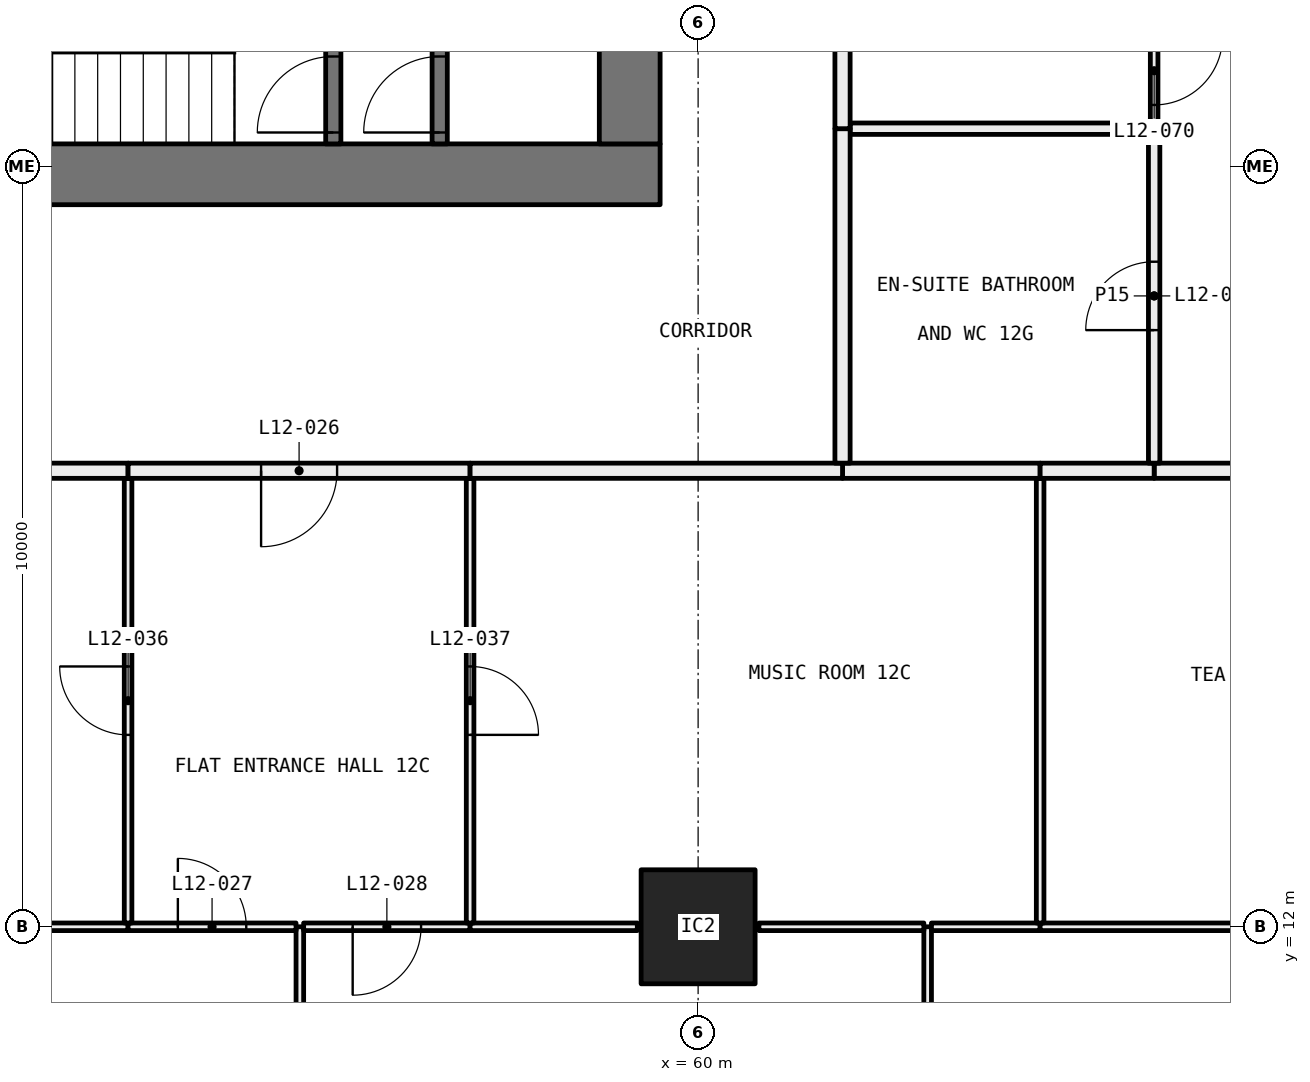
"""IFC4 building model, lengths in metres.
Left out: names, types, materials, properties, quantities, classifications, styles, units other than length and angle.
Written with IfcOpenShell. Run it as: python <this file> out.ifc"""

import sys

from ifc_helpers import new_model, si_unit, direction, frame, frame_2d, origin, origin_2d, place, context, subcontext, project, spatial, rectangle, hollow_rectangle, extrude, element, fill, save


model = new_model("IFC4")
c1 = context("Model", 3, precision=1e-05, world=origin(), true_north=direction((0.0, 1.0)))
c2 = subcontext(c1, "Body", "Model", "MODEL_VIEW")
j1 = project(units=[si_unit("LENGTHUNIT", "METRE"), si_unit("PLANEANGLEUNIT", "RADIAN")], contexts=[c1])
p1 = place(None, origin())
s1 = spatial("IfcSite", under=j1, at=p1, CompositionType="ELEMENT")
p2 = place(p1, origin())
s2 = spatial("IfcBuilding", under=s1, at=p2, CompositionType="ELEMENT")
p3 = place(p2, frame((0.0, 0.0, 54.15)))
s3 = spatial("IfcBuildingStorey", under=s2, at=p3, CompositionType="ELEMENT", Elevation=54.15)
p4 = place(p3, frame((60.0, 12.0, 0.0), z_axis=(0.0, 0.0, 1.0), x_axis=(1.0, 0.0, 0.0)))
e1 = element("IfcColumn", 1, at=p4, inside=s3, PredefinedType="COLUMN", context=c2, shape_type="SweptSolid", body=[
    extrude(hollow_rectangle(XDim=1.5, YDim=1.5, WallThickness=0.065, at=origin_2d()), origin(), (0.0, 0.0, 1.0), 3.05),
])
p5 = place(p3, frame((54.76, 6.05, 0.0), z_axis=(0.0, 0.0, 1.0), x_axis=(0.0, 1.0, 0.0)))
e2 = element("IfcWall", 2, at=p5, inside=s3, PredefinedType="PARTITIONING", context=c2, shape_type="SweptSolid", body=[
    extrude(rectangle(XDim=5.95, YDim=0.1, at=frame_2d((2.975, 0.0))), origin(), (0.0, 0.0, 1.0), 2.45),
])
p6 = place(p3, frame((52.5, 12.0, 0.0), z_axis=(0.0, 0.0, 1.0), x_axis=(-1.0, 0.0, 0.0)))
e3 = element("IfcWall", 3, at=p6, inside=s3, PredefinedType="PARTITIONING", context=c2, shape_type="SweptSolid", body=[
    extrude(rectangle(XDim=3.7, YDim=0.1, at=frame_2d((1.85, 0.0))), origin(), (0.0, 0.0, 1.0), 2.45),
])
p7 = place(p3, frame((54.71, 12.0, 0.0), z_axis=(0.0, 0.0, 1.0), x_axis=(-1.0, 0.0, 0.0)))
e4 = element("IfcWall", 4, at=p7, inside=s3, PredefinedType="PARTITIONING", context=c2, shape_type="SweptSolid", body=[
    extrude(rectangle(XDim=2.21, YDim=0.1, at=frame_2d((1.105, 0.0))), origin(), (0.0, 0.0, 1.0), 2.45),
])
p8 = place(p7, frame((0.655, 0.0, 0.0)))
e5 = element("IfcOpeningElement", 5, at=p8, cuts=e4, PredefinedType="OPENING", context=c2, shape_type="SweptSolid", body=[
    extrude(rectangle(XDim=0.9, YDim=2.1, at=frame_2d((0.45, 1.05))), frame((0.0, 0.06, 0.0), z_axis=(0.0, -1.0, 0.0), x_axis=(1.0, 0.0, 0.0)), (0.0, 0.0, 1.0), 0.12),
])
p9 = place(p3, frame((63.02, 6.05, 0.0), z_axis=(0.0, 0.0, 1.0), x_axis=(0.0, 1.0, 0.0)))
e6 = element("IfcWall", 6, at=p9, inside=s3, PredefinedType="PARTITIONING", context=c2, shape_type="SweptSolid", body=[
    extrude(rectangle(XDim=5.95, YDim=0.1, at=frame_2d((2.975, 0.0))), origin(), (0.0, 0.0, 1.0), 2.45),
])
p10 = place(p9, frame((2.525, 0.0, 0.0)))
e7 = element("IfcOpeningElement", 7, at=p10, cuts=e6, PredefinedType="OPENING", context=c2, shape_type="SweptSolid", body=[
    extrude(rectangle(XDim=0.9, YDim=2.1, at=frame_2d((0.45, 1.05))), frame((0.0, 0.06, 0.0), z_axis=(0.0, -1.0, 0.0), x_axis=(1.0, 0.0, 0.0)), (0.0, 0.0, 1.0), 0.12),
])
p11 = place(p3, frame((57.0, 12.0, 0.0), z_axis=(0.0, 0.0, 1.0), x_axis=(-1.0, 0.0, 0.0)))
e8 = element("IfcWall", 8, at=p11, inside=s3, PredefinedType="PARTITIONING", context=c2, shape_type="SweptSolid", body=[
    extrude(rectangle(XDim=2.19, YDim=0.1, at=frame_2d((1.095, 0.0))), origin(), (0.0, 0.0, 1.0), 2.45),
])
p12 = place(p11, frame((0.645, 0.0, 0.0)))
e9 = element("IfcOpeningElement", 9, at=p12, cuts=e8, PredefinedType="OPENING", context=c2, shape_type="SweptSolid", body=[
    extrude(rectangle(XDim=0.9, YDim=2.1, at=frame_2d((0.45, 1.05))), frame((0.0, 0.06, 0.0), z_axis=(0.0, -1.0, 0.0), x_axis=(1.0, 0.0, 0.0)), (0.0, 0.0, 1.0), 0.12),
])
p13 = place(p3, frame((59.2, 12.0, 0.0), z_axis=(0.0, 0.0, 1.0), x_axis=(-1.0, 0.0, 0.0)))
e10 = element("IfcWall", 10, at=p13, inside=s3, PredefinedType="PARTITIONING", context=c2, shape_type="SweptSolid", body=[
    extrude(rectangle(XDim=2.2, YDim=0.1, at=frame_2d((1.1, 0.0))), origin(), (0.0, 0.0, 1.0), 2.45),
])
p14 = place(p3, frame((62.97, 12.0, 0.0), z_axis=(0.0, 0.0, 1.0), x_axis=(-1.0, 0.0, 0.0)))
e11 = element("IfcWall", 11, at=p14, inside=s3, PredefinedType="PARTITIONING", context=c2, shape_type="SweptSolid", body=[
    extrude(rectangle(XDim=2.17, YDim=0.1, at=frame_2d((1.085, 0.0))), origin(), (0.0, 0.0, 1.0), 2.45),
])
p15 = place(p3, frame((64.5, 12.0, 0.0), z_axis=(0.0, 0.0, 1.0), x_axis=(-1.0, 0.0, 0.0)))
e12 = element("IfcWall", 12, at=p15, inside=s3, PredefinedType="PARTITIONING", context=c2, shape_type="SweptSolid", body=[
    extrude(rectangle(XDim=1.43, YDim=0.1, at=frame_2d((0.715, 0.0))), origin(), (0.0, 0.0, 1.0), 2.45),
])
p16 = place(p3, frame((71.28, 12.0, 0.0), z_axis=(0.0, 0.0, 1.0), x_axis=(-1.0, 0.0, 0.0)))
e13 = element("IfcWall", 13, at=p16, inside=s3, PredefinedType="PARTITIONING", context=c2, shape_type="SweptSolid", body=[
    extrude(rectangle(XDim=6.78, YDim=0.1, at=frame_2d((3.39, 0.0))), origin(), (0.0, 0.0, 1.0), 2.45),
])
p17 = place(p16, frame((2.94, 0.0, 0.0)))
e14 = element("IfcOpeningElement", 14, at=p17, cuts=e13, PredefinedType="OPENING", context=c2, shape_type="SweptSolid", body=[
    extrude(rectangle(XDim=0.9, YDim=2.1, at=frame_2d((0.45, 1.05))), frame((0.0, 0.06, 0.0), z_axis=(0.0, -1.0, 0.0), x_axis=(1.0, 0.0, 0.0)), (0.0, 0.0, 1.0), 0.12),
])
p18 = place(p3, frame((52.5, 12.05, 0.0), z_axis=(0.0, 0.0, 1.0), x_axis=(0.0, 1.0, 0.0)))
e15 = element("IfcWall", 15, at=p18, inside=s3, PredefinedType="PARTITIONING", context=c2, shape_type="SweptSolid", body=[
    extrude(rectangle(XDim=5.85, YDim=0.1, at=frame_2d((2.925, 0.0))), origin(), (0.0, 0.0, 1.0), 2.45),
])
p19 = place(p18, frame((2.475, 0.0, 0.0)))
e16 = element("IfcOpeningElement", 16, at=p19, cuts=e15, PredefinedType="OPENING", context=c2, shape_type="SweptSolid", body=[
    extrude(rectangle(XDim=0.9, YDim=2.1, at=frame_2d((0.45, 1.05))), frame((0.0, 0.06, 0.0), z_axis=(0.0, -1.0, 0.0), x_axis=(1.0, 0.0, 0.0)), (0.0, 0.0, 1.0), 0.12),
])
p20 = place(p3, frame((52.5, 18.0, 0.0), z_axis=(0.0, 0.0, 1.0), x_axis=(-1.0, 0.0, 0.0)))
e17 = element("IfcWall", 17, at=p20, inside=s3, PredefinedType="PARTITIONING", context=c2, shape_type="SweptSolid", body=[
    extrude(rectangle(XDim=6.4, YDim=0.2, at=frame_2d((3.2, 0.0))), origin(), (0.0, 0.0, 1.0), 3.05),
])
p21 = place(p3, frame((57.0, 12.05, 0.0), z_axis=(0.0, 0.0, 1.0), x_axis=(0.0, 1.0, 0.0)))
e18 = element("IfcWall", 18, at=p21, inside=s3, PredefinedType="PARTITIONING", context=c2, shape_type="SweptSolid", body=[
    extrude(rectangle(XDim=5.85, YDim=0.1, at=frame_2d((2.925, 0.0))), origin(), (0.0, 0.0, 1.0), 2.45),
])
p22 = place(p21, frame((2.475, 0.0, 0.0)))
e19 = element("IfcOpeningElement", 19, at=p22, cuts=e18, PredefinedType="OPENING", context=c2, shape_type="SweptSolid", body=[
    extrude(rectangle(XDim=0.9, YDim=2.1, at=frame_2d((0.45, 1.05))), frame((0.0, 0.06, 0.0), z_axis=(0.0, -1.0, 0.0), x_axis=(1.0, 0.0, 0.0)), (0.0, 0.0, 1.0), 0.12),
])
p23 = place(p3, frame((57.0, 18.0, 0.0), z_axis=(0.0, 0.0, 1.0), x_axis=(-1.0, 0.0, 0.0)))
e20 = element("IfcWall", 20, at=p23, inside=s3, PredefinedType="PARTITIONING", context=c2, shape_type="SweptSolid", body=[
    extrude(rectangle(XDim=4.5, YDim=0.2, at=frame_2d((2.25, 0.0))), origin(), (0.0, 0.0, 1.0), 3.05),
])
p24 = place(p23, frame((1.75, 0.0, 0.0)))
e21 = element("IfcOpeningElement", 21, at=p24, cuts=e20, PredefinedType="OPENING", context=c2, shape_type="SweptSolid", body=[
    extrude(rectangle(XDim=1.0, YDim=2.1, at=frame_2d((0.5, 1.05))), frame((0.0, 0.11, 0.0), z_axis=(0.0, -1.0, 0.0), x_axis=(1.0, 0.0, 0.0)), (0.0, 0.0, 1.0), 0.22),
])
p25 = place(p3, frame((64.5, 12.05, 0.0), z_axis=(0.0, 0.0, 1.0), x_axis=(0.0, 1.0, 0.0)))
e22 = element("IfcWall", 22, at=p25, inside=s3, PredefinedType="PARTITIONING", context=c2, shape_type="SweptSolid", body=[
    extrude(rectangle(XDim=5.85, YDim=0.1, at=frame_2d((2.925, 0.0))), origin(), (0.0, 0.0, 1.0), 2.45),
])
p26 = place(p3, frame((64.5, 18.0, 0.0), z_axis=(0.0, 0.0, 1.0), x_axis=(-1.0, 0.0, 0.0)))
e23 = element("IfcWall", 23, at=p26, inside=s3, PredefinedType="PARTITIONING", context=c2, shape_type="SweptSolid", body=[
    extrude(rectangle(XDim=2.6, YDim=0.2, at=frame_2d((1.3, 0.0))), origin(), (0.0, 0.0, 1.0), 3.05),
])
p27 = place(p3, frame((61.9, 18.0, 0.0), z_axis=(0.0, 0.0, 1.0), x_axis=(-1.0, 0.0, 0.0)))
e24 = element("IfcWall", 24, at=p27, inside=s3, PredefinedType="PARTITIONING", context=c2, shape_type="SweptSolid", body=[
    extrude(rectangle(XDim=4.9, YDim=0.2, at=frame_2d((2.45, 0.0))), origin(), (0.0, 0.0, 1.0), 3.05),
])
p28 = place(p3, frame((71.28, 18.0, 0.0), z_axis=(0.0, 0.0, 1.0), x_axis=(-1.0, 0.0, 0.0)))
e25 = element("IfcWall", 25, at=p28, inside=s3, PredefinedType="PARTITIONING", context=c2, shape_type="SweptSolid", body=[
    extrude(rectangle(XDim=5.28, YDim=0.2, at=frame_2d((2.64, 0.0))), origin(), (0.0, 0.0, 1.0), 3.05),
])
p29 = place(p3, frame((66.0, 18.0, 0.0), z_axis=(0.0, 0.0, 1.0), x_axis=(-1.0, 0.0, 0.0)))
e26 = element("IfcWall", 26, at=p29, inside=s3, PredefinedType="PARTITIONING", context=c2, shape_type="SweptSolid", body=[
    extrude(rectangle(XDim=1.5, YDim=0.2, at=frame_2d((0.75, 0.0))), origin(), (0.0, 0.0, 1.0), 3.05),
])
p30 = place(p3, frame((66.0, 22.5, 0.0), z_axis=(0.0, 0.0, 1.0), x_axis=(0.0, -1.0, 0.0)))
e27 = element("IfcWall", 27, at=p30, inside=s3, PredefinedType="PARTITIONING", context=c2, shape_type="SweptSolid", body=[
    extrude(rectangle(XDim=4.4, YDim=0.15, at=frame_2d((2.2, 0.0))), origin(), (0.0, 0.0, 1.0), 3.05),
])
p31 = place(p30, frame((1.75, 0.0, 0.0)))
e28 = element("IfcOpeningElement", 28, at=p31, cuts=e27, PredefinedType="OPENING", context=c2, shape_type="SweptSolid", body=[
    extrude(rectangle(XDim=0.9, YDim=2.1, at=frame_2d((0.45, 1.05))), frame((0.0, 0.085, 0.0), z_axis=(0.0, -1.0, 0.0), x_axis=(1.0, 0.0, 0.0)), (0.0, 0.0, 1.0), 0.17),
])
p32 = place(p3, frame((66.0, 23.95, 0.0), z_axis=(0.0, 0.0, 1.0), x_axis=(0.0, -1.0, 0.0)))
e29 = element("IfcWall", 29, at=p32, inside=s3, PredefinedType="PARTITIONING", context=c2, shape_type="SweptSolid", body=[
    extrude(rectangle(XDim=1.375, YDim=0.1, at=frame_2d((0.688, 0.0))), origin(), (0.0, 0.0, 1.0), 2.45),
])
p33 = place(p32, frame((0.238, 0.0, 0.0)))
e30 = element("IfcOpeningElement", 30, at=p33, cuts=e29, PredefinedType="OPENING", context=c2, shape_type="SweptSolid", body=[
    extrude(rectangle(XDim=0.9, YDim=2.1, at=frame_2d((0.45, 1.05))), frame((0.0, 0.06, 0.0), z_axis=(0.0, -1.0, 0.0), x_axis=(1.0, 0.0, 0.0)), (0.0, 0.0, 1.0), 0.12),
])
p34 = place(p3, frame((65.925, 22.5, 0.0), z_axis=(0.0, 0.0, 1.0), x_axis=(-1.0, 0.0, 0.0)))
e31 = element("IfcWall", 31, at=p34, inside=s3, PredefinedType="PARTITIONING", context=c2, shape_type="SweptSolid", body=[
    extrude(rectangle(XDim=3.925, YDim=0.15, at=frame_2d((1.962, 0.0))), origin(), (0.0, 0.0, 1.0), 3.05),
])
p35 = place(p3, frame((61.9, 22.5, 0.0), z_axis=(0.0, 0.0, 1.0), x_axis=(0.0, -1.0, 0.0)))
e32 = element("IfcWall", 32, at=p35, inside=s3, PredefinedType="PARTITIONING", context=c2, shape_type="SweptSolid", body=[
    extrude(rectangle(XDim=4.4, YDim=0.2, at=frame_2d((2.2, 0.0))), origin(), (0.0, 0.0, 1.0), 3.05),
])
p36 = place(p3, frame((61.9, 23.9, 0.0), z_axis=(0.0, 0.0, 1.0), x_axis=(0.0, -1.0, 0.0)))
e33 = element("IfcWall", 33, at=p36, inside=s3, PredefinedType="PARTITIONING", context=c2, shape_type="SweptSolid", body=[
    extrude(rectangle(XDim=1.4, YDim=0.2, at=frame_2d((0.7, 0.0))), origin(), (0.0, 0.0, 1.0), 3.05),
])
p37 = place(p3, frame((59.5, 21.9, 0.0), z_axis=(0.0, 0.0, 1.0), x_axis=(-1.0, 0.0, 0.0)))
e34 = element("IfcWall", 34, at=p37, inside=s3, PredefinedType="SHEAR", context=c2, shape_type="SweptSolid", body=[
    extrude(rectangle(XDim=11.0, YDim=0.8, at=frame_2d((5.5, 0.0))), origin(), (0.0, 0.0, 1.0), 3.05),
])
p38 = place(p3, frame((59.1, 22.3, 0.0), z_axis=(0.0, 0.0, 1.0), x_axis=(0.0, 1.0, 0.0)))
e35 = element("IfcWall", 35, at=p38, inside=s3, PredefinedType="SHEAR", context=c2, shape_type="SweptSolid", body=[
    extrude(rectangle(XDim=15.4, YDim=0.8, at=frame_2d((7.7, 0.0))), origin(), (0.0, 0.0, 1.0), 3.05),
])
p39 = place(p38, frame((8.15, 0.0, 0.0)))
e36 = element("IfcOpeningElement", 36, at=p39, cuts=e35, PredefinedType="OPENING", context=c2, shape_type="SweptSolid", body=[
    extrude(rectangle(XDim=1.6, YDim=2.1, at=frame_2d((0.8, 1.05))), frame((0.0, 0.41, 0.0), z_axis=(0.0, -1.0, 0.0), x_axis=(1.0, 0.0, 0.0)), (0.0, 0.0, 1.0), 0.82),
])
p40 = place(p38, frame((2.05, 0.0, 0.0)))
e37 = element("IfcOpeningElement", 37, at=p40, cuts=e35, PredefinedType="OPENING", context=c2, shape_type="SweptSolid", body=[
    extrude(rectangle(XDim=1.0, YDim=2.1, at=frame_2d((0.5, 1.05))), frame((0.0, 0.41, 0.0), z_axis=(0.0, -1.0, 0.0), x_axis=(1.0, 0.0, 0.0)), (0.0, 0.0, 1.0), 0.82),
])
p41 = place(p3, frame((56.6, 22.3, 0.0), z_axis=(0.0, 0.0, 1.0), x_axis=(0.0, 1.0, 0.0)))
e38 = element("IfcWall", 38, at=p41, inside=s3, PredefinedType="SOLIDWALL", context=c2, shape_type="SweptSolid", body=[
    extrude(rectangle(XDim=12.6, YDim=0.2, at=frame_2d((6.3, 0.0))), origin(), (0.0, 0.0, 1.0), 3.05),
])
p42 = place(p41, frame((3.4, 0.0, 0.0)))
e39 = element("IfcOpeningElement", 39, at=p42, cuts=e38, PredefinedType="OPENING", context=c2, shape_type="SweptSolid", body=[
    extrude(rectangle(XDim=1.1, YDim=2.1, at=frame_2d((0.55, 1.05))), frame((0.0, 0.11, 0.0), z_axis=(0.0, -1.0, 0.0), x_axis=(1.0, 0.0, 0.0)), (0.0, 0.0, 1.0), 0.22),
])
p43 = place(p41, frame((5.9, 0.0, 0.0)))
e40 = element("IfcOpeningElement", 40, at=p43, cuts=e38, PredefinedType="OPENING", context=c2, shape_type="SweptSolid", body=[
    extrude(rectangle(XDim=1.1, YDim=2.1, at=frame_2d((0.55, 1.05))), frame((0.0, 0.11, 0.0), z_axis=(0.0, -1.0, 0.0), x_axis=(1.0, 0.0, 0.0)), (0.0, 0.0, 1.0), 0.22),
])
p44 = place(p41, frame((8.4, 0.0, 0.0)))
e41 = element("IfcOpeningElement", 41, at=p44, cuts=e38, PredefinedType="OPENING", context=c2, shape_type="SweptSolid", body=[
    extrude(rectangle(XDim=1.1, YDim=2.1, at=frame_2d((0.55, 1.05))), frame((0.0, 0.11, 0.0), z_axis=(0.0, -1.0, 0.0), x_axis=(1.0, 0.0, 0.0)), (0.0, 0.0, 1.0), 0.22),
])
p45 = place(p41, frame((10.9, 0.0, 0.0)))
e42 = element("IfcOpeningElement", 42, at=p45, cuts=e38, PredefinedType="OPENING", context=c2, shape_type="SweptSolid", body=[
    extrude(rectangle(XDim=1.1, YDim=2.1, at=frame_2d((0.55, 1.05))), frame((0.0, 0.11, 0.0), z_axis=(0.0, -1.0, 0.0), x_axis=(1.0, 0.0, 0.0)), (0.0, 0.0, 1.0), 0.22),
])
p46 = place(p41, frame((0.15, 0.0, 0.0)))
e43 = element("IfcOpeningElement", 43, at=p46, cuts=e38, PredefinedType="OPENING", context=c2, shape_type="SweptSolid", body=[
    extrude(rectangle(XDim=1.0, YDim=2.1, at=frame_2d((0.5, 1.05))), frame((0.0, 0.11, 0.0), z_axis=(0.0, -1.0, 0.0), x_axis=(1.0, 0.0, 0.0)), (0.0, 0.0, 1.0), 0.22),
])
p47 = place(p3, frame((55.2, 22.3, 0.0), z_axis=(0.0, 0.0, 1.0), x_axis=(0.0, 1.0, 0.0)))
e44 = element("IfcWall", 44, at=p47, inside=s3, PredefinedType="SOLIDWALL", context=c2, shape_type="SweptSolid", body=[
    extrude(rectangle(XDim=2.6, YDim=0.2, at=frame_2d((1.3, 0.0))), origin(), (0.0, 0.0, 1.0), 3.05),
])
p48 = place(p47, frame((0.15, 0.0, 0.0)))
e45 = element("IfcOpeningElement", 45, at=p48, cuts=e44, PredefinedType="OPENING", context=c2, shape_type="SweptSolid", body=[
    extrude(rectangle(XDim=1.0, YDim=2.1, at=frame_2d((0.5, 1.05))), frame((0.0, 0.11, 0.0), z_axis=(0.0, -1.0, 0.0), x_axis=(1.0, 0.0, 0.0)), (0.0, 0.0, 1.0), 0.22),
])
p49 = place(p24, origin())
e46 = element("IfcDoor", 46, at=p49, inside=s3, OperationType="SINGLE_SWING_LEFT", PredefinedType="DOOR", context=c2, shape_type="SweptSolid", body=[
    extrude(rectangle(XDim=1.0, YDim=2.1, at=frame_2d((0.5, 1.05))), frame((0.0, 0.025, 0.0), z_axis=(0.0, -1.0, 0.0), x_axis=(1.0, 0.0, 0.0)), (0.0, 0.0, 1.0), 0.05),
])
fill(e21, e46)
p50 = place(p8, frame((0.9, 0.0, 0.0), x_axis=(-1.0, 0.0, 0.0)))
e47 = element("IfcDoor", 47, at=p50, inside=s3, OperationType="SINGLE_SWING_RIGHT", PredefinedType="DOOR", context=c2, shape_type="SweptSolid", body=[
    extrude(rectangle(XDim=0.9, YDim=2.1, at=frame_2d((0.45, 1.05))), frame((0.0, 0.025, 0.0), z_axis=(0.0, -1.0, 0.0), x_axis=(1.0, 0.0, 0.0)), (0.0, 0.0, 1.0), 0.05),
])
fill(e5, e47)
p51 = place(p12, origin())
e48 = element("IfcDoor", 48, at=p51, inside=s3, OperationType="SINGLE_SWING_LEFT", PredefinedType="DOOR", context=c2, shape_type="SweptSolid", body=[
    extrude(rectangle(XDim=0.9, YDim=2.1, at=frame_2d((0.45, 1.05))), frame((0.0, 0.025, 0.0), z_axis=(0.0, -1.0, 0.0), x_axis=(1.0, 0.0, 0.0)), (0.0, 0.0, 1.0), 0.05),
])
fill(e9, e48)
p52 = place(p19, origin())
e49 = element("IfcDoor", 49, at=p52, inside=s3, OperationType="SINGLE_SWING_LEFT", PredefinedType="DOOR", context=c2, shape_type="SweptSolid", body=[
    extrude(rectangle(XDim=0.9, YDim=2.1, at=frame_2d((0.45, 1.05))), frame((0.0, 0.025, 0.0), z_axis=(0.0, -1.0, 0.0), x_axis=(1.0, 0.0, 0.0)), (0.0, 0.0, 1.0), 0.05),
])
fill(e16, e49)
p53 = place(p22, frame((0.9, 0.0, 0.0), x_axis=(-1.0, 0.0, 0.0)))
e50 = element("IfcDoor", 50, at=p53, inside=s3, OperationType="SINGLE_SWING_LEFT", PredefinedType="DOOR", context=c2, shape_type="SweptSolid", body=[
    extrude(rectangle(XDim=0.9, YDim=2.1, at=frame_2d((0.45, 1.05))), frame((0.0, 0.025, 0.0), z_axis=(0.0, -1.0, 0.0), x_axis=(1.0, 0.0, 0.0)), (0.0, 0.0, 1.0), 0.05),
])
fill(e19, e50)
p54 = place(p33, origin())
e51 = element("IfcDoor", 51, at=p54, inside=s3, OperationType="SINGLE_SWING_RIGHT", PredefinedType="DOOR", context=c2, shape_type="SweptSolid", body=[
    extrude(rectangle(XDim=0.9, YDim=2.1, at=frame_2d((0.45, 1.05))), frame((0.0, 0.025, 0.0), z_axis=(0.0, -1.0, 0.0), x_axis=(1.0, 0.0, 0.0)), (0.0, 0.0, 1.0), 0.05),
])
fill(e30, e51)
p55 = place(p31, frame((0.9, 0.0, 0.0), x_axis=(-1.0, 0.0, 0.0)))
e52 = element("IfcDoor", 52, at=p55, inside=s3, OperationType="SINGLE_SWING_RIGHT", PredefinedType="DOOR", context=c2, shape_type="SweptSolid", body=[
    extrude(rectangle(XDim=0.9, YDim=2.1, at=frame_2d((0.45, 1.05))), frame((0.0, 0.025, 0.0), z_axis=(0.0, -1.0, 0.0), x_axis=(1.0, 0.0, 0.0)), (0.0, 0.0, 1.0), 0.05),
])
fill(e28, e52)
p56 = place(p48, origin())
e53 = element("IfcDoor", 53, at=p56, inside=s3, OperationType="SINGLE_SWING_RIGHT", PredefinedType="DOOR", context=c2, shape_type="SweptSolid", body=[
    extrude(rectangle(XDim=1.0, YDim=2.1, at=frame_2d((0.5, 1.05))), frame((0.0, 0.025, 0.0), z_axis=(0.0, -1.0, 0.0), x_axis=(1.0, 0.0, 0.0)), (0.0, 0.0, 1.0), 0.05),
])
fill(e45, e53)
p57 = place(p46, origin())
e54 = element("IfcDoor", 54, at=p57, inside=s3, OperationType="SINGLE_SWING_RIGHT", PredefinedType="DOOR", context=c2, shape_type="SweptSolid", body=[
    extrude(rectangle(XDim=1.0, YDim=2.1, at=frame_2d((0.5, 1.05))), frame((0.0, 0.025, 0.0), z_axis=(0.0, -1.0, 0.0), x_axis=(1.0, 0.0, 0.0)), (0.0, 0.0, 1.0), 0.05),
])
fill(e43, e54)
save(model, sys.argv[1])
